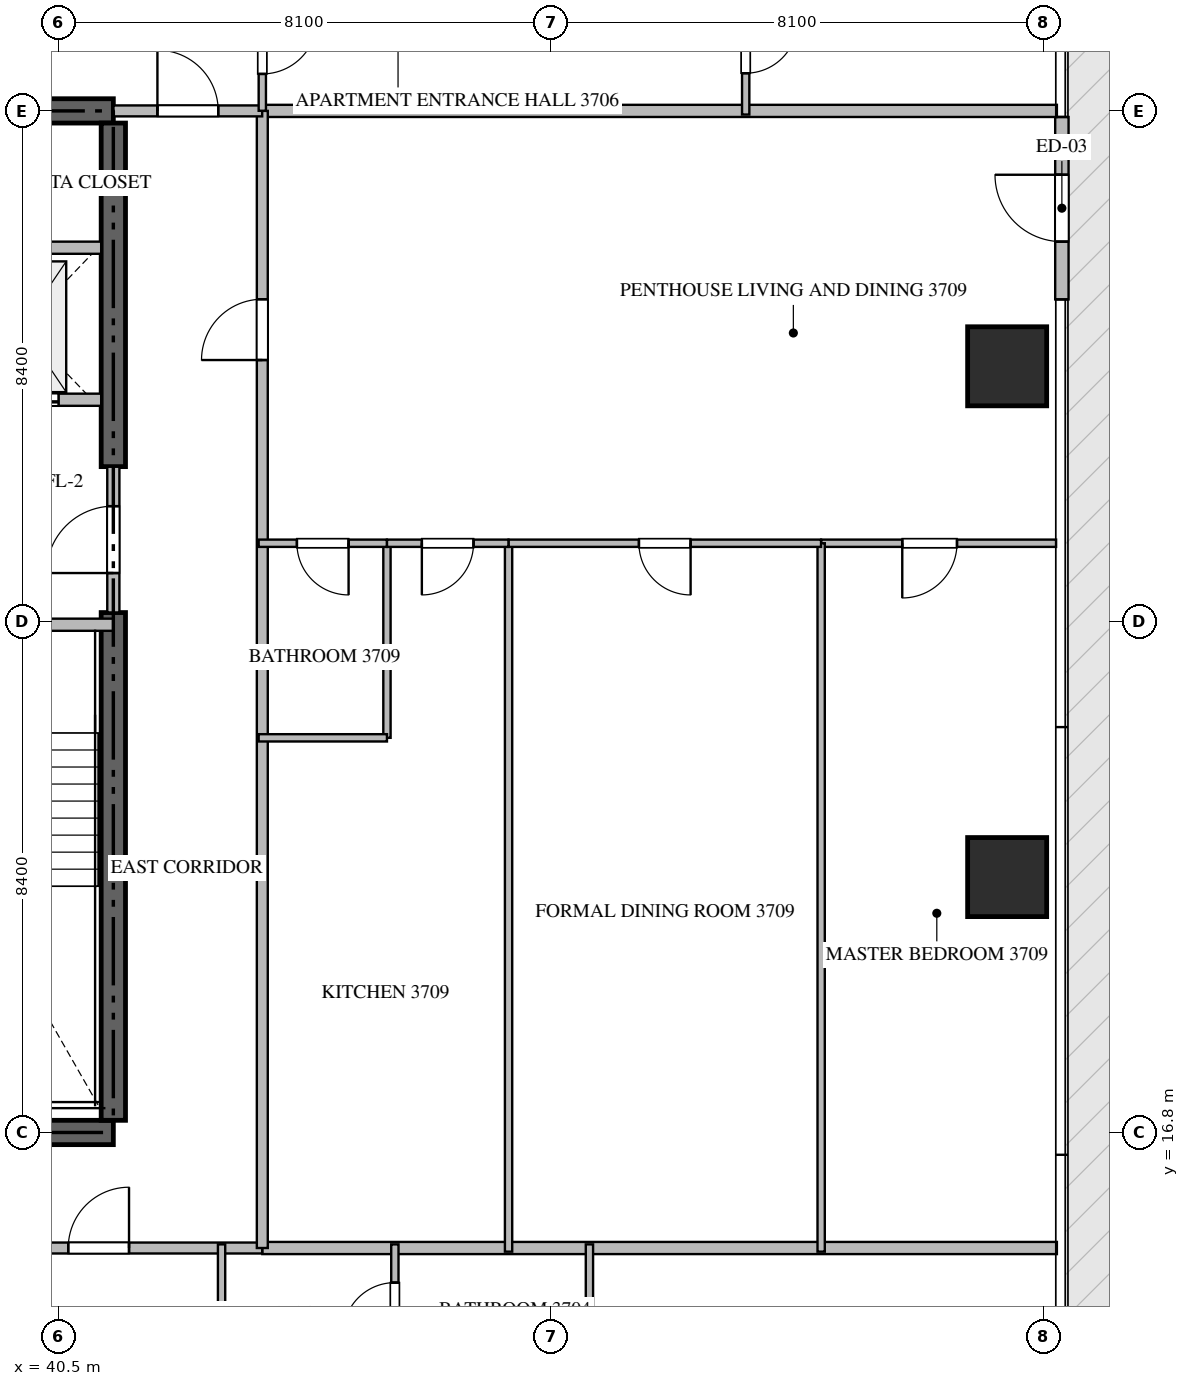
"""IFC4 building model, lengths in metres.
Left out: names, types, materials, properties, quantities, classifications, styles, units other than length and angle.
Written with IfcOpenShell. Run it as: python <this file> out.ifc"""

import sys

from ifc_helpers import new_model, si_unit, direction, frame, frame_2d, origin, origin_2d, place, context, subcontext, project, spatial, rectangle, extrude, source, transform, mapped, element, fill, save


model = new_model("IFC4")
c1 = context("Model", 3, precision=1e-05, world=origin(), true_north=direction((0.0, 1.0)))
c2 = subcontext(c1, "Body", "Model", "MODEL_VIEW")
j1 = project(units=[si_unit("LENGTHUNIT", "METRE"), si_unit("PLANEANGLEUNIT", "RADIAN")], contexts=[c1])
p1 = place(None, origin())
s1 = spatial("IfcSite", under=j1, at=p1, CompositionType="ELEMENT")
p2 = place(p1, origin())
s2 = spatial("IfcBuilding", under=s1, at=p2, CompositionType="ELEMENT")
p3 = place(p2, frame((0.0, 0.0, 150.15)))
s3 = spatial("IfcBuildingStorey", under=s2, at=p3, CompositionType="ELEMENT", Elevation=150.15)
for number, where, z_axis, x_axis in (
    (1, (23.4, 16.8, -0.26), (0.0, 0.0, 1.0), (1.0, 0.0, 0.0)),
    (2, (41.4, 33.6, -0.26), (0.0, 0.0, 1.0), (-1.0, 0.0, 0.0)),
):
    element("IfcWall", number, at=place(p3, frame(where, z_axis=z_axis, x_axis=x_axis)), inside=s3, PredefinedType="SHEAR", context=c2, shape_type="SweptSolid", body=[
        extrude(rectangle(XDim=18.0, YDim=0.4, at=frame_2d((9.0, 0.0))), origin(), (0.0, 0.0, 1.0), 3.748),
    ])
p4 = place(p3, frame((41.4, 17.0, -0.26), z_axis=(0.0, 0.0, 1.0), x_axis=(0.0, 1.0, 0.0)))
e3 = element("IfcWall", 3, at=p4, inside=s3, PredefinedType="SHEAR", context=c2, shape_type="SweptSolid", body=[
    extrude(rectangle(XDim=8.35, YDim=0.4, at=frame_2d((4.175, 0.0))), origin(), (0.0, 0.0, 1.0), 3.748),
])
p5 = place(p3, frame((41.4, 27.75, -0.26), z_axis=(0.0, 0.0, 1.0), x_axis=(0.0, 1.0, 0.0)))
e4 = element("IfcWall", 4, at=p5, inside=s3, PredefinedType="SHEAR", context=c2, shape_type="SweptSolid", body=[
    extrude(rectangle(XDim=5.65, YDim=0.4, at=frame_2d((2.825, 0.0))), origin(), (0.0, 0.0, 1.0), 3.748),
])
m1 = source(origin(), c2, "Body", "SweptSolid", [
    extrude(rectangle(XDim=1.3, YDim=1.3, at=origin_2d()), origin(), (0.0, 0.0, 1.0), 3.75),
])
for number, where, z_axis, x_axis in (
    (5, (56.1, 21.0, -0.26), (0.0, 0.0, 1.0), (1.0, 0.0, 0.0)),
    (6, (56.1, 29.4, -0.26), (0.0, 0.0, 1.0), (1.0, 0.0, 0.0)),
):
    element("IfcColumn", number, at=place(p3, frame(where, z_axis=z_axis, x_axis=x_axis)), inside=s3, PredefinedType="COLUMN", context=c2, shape_type="MappedRepresentation", body=[
        mapped(m1, transform((0.0, 0.0, 0.0), scale=1.0)),
    ])
p6 = place(p3, frame((57.0, 30.5, 0.0), z_axis=(0.0, 0.0, 1.0), x_axis=(0.0, 1.0, 0.0)))
e7 = element("IfcWall", 7, at=p6, inside=s3, PredefinedType="ELEMENTEDWALL", context=c2, shape_type="SweptSolid", body=[
    extrude(rectangle(XDim=3.0, YDim=0.22, at=frame_2d((1.5, 0.0))), origin(), (0.0, 0.0, 1.0), 3.475),
])
p7 = place(p6, frame((0.95, 0.0, 0.0)))
e8 = element("IfcOpeningElement", 8, at=p7, cuts=e7, PredefinedType="OPENING", context=c2, shape_type="SweptSolid", body=[
    extrude(rectangle(XDim=1.1, YDim=2.2, at=frame_2d((0.55, 1.1))), frame((0.0, 0.12, 0.0), z_axis=(0.0, -1.0, 0.0), x_axis=(1.0, 0.0, 0.0)), (0.0, 0.0, 1.0), 0.24),
])
p8 = place(p3, frame((36.95, 25.15, 0.0), z_axis=(0.0, 0.0, 1.0), x_axis=(1.0, 0.0, 0.0)))
e9 = element("IfcWall", 9, at=p8, inside=s3, PredefinedType="STANDARD", context=c2, shape_type="SweptSolid", body=[
    extrude(rectangle(XDim=4.45, YDim=0.2, at=frame_2d((2.225, 0.0))), origin(), (0.0, 0.0, 1.0), 3.49),
])
p9 = place(p8, frame((1.65, 0.0, 0.0)))
e10 = element("IfcOpeningElement", 10, at=p9, cuts=e9, PredefinedType="OPENING", context=c2, shape_type="SweptSolid", body=[
    extrude(rectangle(XDim=1.1, YDim=2.15, at=frame_2d((0.55, 1.075))), frame((0.0, 0.11, 0.0), z_axis=(0.0, -1.0, 0.0), x_axis=(1.0, 0.0, 0.0)), (0.0, 0.0, 1.0), 0.22),
])
p10 = place(p3, frame((38.75, 28.85, 0.0), z_axis=(0.0, 0.0, 1.0), x_axis=(1.0, 0.0, 0.0)))
e11 = element("IfcWall", 11, at=p10, inside=s3, PredefinedType="STANDARD", context=c2, shape_type="SweptSolid", body=[
    extrude(rectangle(XDim=2.45, YDim=0.2, at=frame_2d((1.225, 0.0))), origin(), (0.0, 0.0, 1.0), 3.49),
])
p11 = place(p10, frame((0.55, 0.0, 0.0)))
e12 = element("IfcOpeningElement", 12, at=p11, cuts=e11, PredefinedType="OPENING", context=c2, shape_type="SweptSolid", body=[
    extrude(rectangle(XDim=1.2, YDim=2.2, at=frame_2d((0.6, 1.1))), frame((0.0, 0.11, 0.0), z_axis=(0.0, -1.0, 0.0), x_axis=(1.0, 0.0, 0.0)), (0.0, 0.0, 1.0), 0.22),
])
p12 = place(p3, frame((38.75, 31.35, 0.0), z_axis=(0.0, 0.0, 1.0), x_axis=(1.0, 0.0, 0.0)))
e13 = element("IfcWall", 13, at=p12, inside=s3, PredefinedType="STANDARD", context=c2, shape_type="SweptSolid", body=[
    extrude(rectangle(XDim=2.45, YDim=0.2, at=frame_2d((1.225, 0.0))), origin(), (0.0, 0.0, 1.0), 3.49),
])
p13 = place(p3, frame((41.4, 25.352, 0.0), z_axis=(0.0, 0.0, 1.0), x_axis=(0.0, 1.0, 0.0)))
e14 = element("IfcWall", 14, at=p13, inside=s3, PredefinedType="STANDARD", context=c2, shape_type="SweptSolid", body=[
    extrude(rectangle(XDim=2.396, YDim=0.2, at=frame_2d((1.198, 0.0))), origin(), (0.0, 0.0, 1.0), 3.49),
])
p14 = place(p13, frame((0.648, 0.0, 0.0)))
e15 = element("IfcOpeningElement", 15, at=p14, cuts=e14, PredefinedType="OPENING", context=c2, shape_type="SweptSolid", body=[
    extrude(rectangle(XDim=1.1, YDim=2.15, at=frame_2d((0.55, 1.075))), frame((0.0, 0.11, 0.0), z_axis=(0.0, -1.0, 0.0), x_axis=(1.0, 0.0, 0.0)), (0.0, 0.0, 1.0), 0.22),
])
for number, where, z_axis, x_axis in (
    (16, (43.85, 14.9, 0.0), (0.0, 0.0, 1.0), (1.0, 0.0, 0.0)),
    (17, (43.85, 33.6, 0.0), (0.0, 0.0, 1.0), (1.0, 0.0, 0.0)),
):
    element("IfcWall", number, at=place(p3, frame(where, z_axis=z_axis, x_axis=x_axis)), inside=s3, PredefinedType="PARTITIONING", context=c2, shape_type="SweptSolid", body=[
        extrude(rectangle(XDim=13.068, YDim=0.2, at=frame_2d((6.534, 0.0))), origin(), (0.0, 0.0, 1.0), 3.49),
    ])
p15 = place(p3, frame((20.952, 14.9, 0.0), z_axis=(0.0, 0.0, 1.0), x_axis=(1.0, 0.0, 0.0)))
e18 = element("IfcWall", 18, at=p15, inside=s3, PredefinedType="PARTITIONING", context=c2, shape_type="SweptSolid", body=[
    extrude(rectangle(XDim=22.896, YDim=0.18, at=frame_2d((11.448, 0.0))), origin(), (0.0, 0.0, 1.0), 3.49),
])
p16 = place(p15, frame((2.19, 0.0, 0.0)))
e19 = element("IfcOpeningElement", 19, at=p16, cuts=e18, PredefinedType="OPENING", context=c2, shape_type="SweptSolid", body=[
    extrude(rectangle(XDim=1.0, YDim=2.15, at=frame_2d((0.5, 1.075))), frame((0.0, 0.1, 0.0), z_axis=(0.0, -1.0, 0.0), x_axis=(1.0, 0.0, 0.0)), (0.0, 0.0, 1.0), 0.2),
])
p17 = place(p15, frame((5.802, 0.0, 0.0)))
e20 = element("IfcOpeningElement", 20, at=p17, cuts=e18, PredefinedType="OPENING", context=c2, shape_type="SweptSolid", body=[
    extrude(rectangle(XDim=1.0, YDim=2.15, at=frame_2d((0.5, 1.075))), frame((0.0, 0.1, 0.0), z_axis=(0.0, -1.0, 0.0), x_axis=(1.0, 0.0, 0.0)), (0.0, 0.0, 1.0), 0.2),
])
p18 = place(p15, frame((12.196, 0.0, 0.0)))
e21 = element("IfcOpeningElement", 21, at=p18, cuts=e18, PredefinedType="OPENING", context=c2, shape_type="SweptSolid", body=[
    extrude(rectangle(XDim=1.0, YDim=2.15, at=frame_2d((0.5, 1.075))), frame((0.0, 0.1, 0.0), z_axis=(0.0, -1.0, 0.0), x_axis=(1.0, 0.0, 0.0)), (0.0, 0.0, 1.0), 0.2),
])
p19 = place(p15, frame((19.706, 0.0, 0.0)))
e22 = element("IfcOpeningElement", 22, at=p19, cuts=e18, PredefinedType="OPENING", context=c2, shape_type="SweptSolid", body=[
    extrude(rectangle(XDim=1.0, YDim=2.15, at=frame_2d((0.5, 1.075))), frame((0.0, 0.1, 0.0), z_axis=(0.0, -1.0, 0.0), x_axis=(1.0, 0.0, 0.0)), (0.0, 0.0, 1.0), 0.2),
])
p20 = place(p3, frame((43.85, 14.9, 0.0), z_axis=(0.0, 0.0, 1.0), x_axis=(0.0, 1.0, 0.0)))
e23 = element("IfcWall", 23, at=p20, inside=s3, PredefinedType="PARTITIONING", context=c2, shape_type="SweptSolid", body=[
    extrude(rectangle(XDim=18.7, YDim=0.18, at=frame_2d((9.35, 0.0))), origin(), (0.0, 0.0, 1.0), 3.49),
])
p21 = place(p20, frame((14.603, 0.0, 0.0)))
e24 = element("IfcOpeningElement", 24, at=p21, cuts=e23, PredefinedType="OPENING", context=c2, shape_type="SweptSolid", body=[
    extrude(rectangle(XDim=1.0, YDim=2.15, at=frame_2d((0.5, 1.075))), frame((0.0, 0.1, 0.0), z_axis=(0.0, -1.0, 0.0), x_axis=(1.0, 0.0, 0.0)), (0.0, 0.0, 1.0), 0.2),
])
p22 = place(p3, frame((41.402, 33.6, 0.0), z_axis=(0.0, 0.0, 1.0), x_axis=(1.0, 0.0, 0.0)))
e25 = element("IfcWall", 25, at=p22, inside=s3, PredefinedType="PARTITIONING", context=c2, shape_type="SweptSolid", body=[
    extrude(rectangle(XDim=2.446, YDim=0.18, at=frame_2d((1.223, 0.0))), origin(), (0.0, 0.0, 1.0), 3.49),
])
p23 = place(p22, frame((0.723, 0.0, 0.0)))
e26 = element("IfcOpeningElement", 26, at=p23, cuts=e25, PredefinedType="OPENING", context=c2, shape_type="SweptSolid", body=[
    extrude(rectangle(XDim=1.0, YDim=2.15, at=frame_2d((0.5, 1.075))), frame((0.0, 0.1, 0.0), z_axis=(0.0, -1.0, 0.0), x_axis=(1.0, 0.0, 0.0)), (0.0, 0.0, 1.0), 0.2),
])
p24 = place(p3, frame((43.18, 12.15, 0.0), z_axis=(0.0, 0.0, 1.0), x_axis=(0.0, 1.0, 0.0)))
e27 = element("IfcWall", 27, at=p24, inside=s3, PredefinedType="PARTITIONING", context=c2, shape_type="SweptSolid", body=[
    extrude(rectangle(XDim=2.81, YDim=0.12, at=frame_2d((1.405, 0.0))), origin(), (0.0, 0.0, 1.0), 3.49),
])
p25 = place(p3, frame((49.23, 12.85, 0.0), z_axis=(0.0, 0.0, 1.0), x_axis=(0.0, 1.0, 0.0)))
e28 = element("IfcWall", 28, at=p25, inside=s3, PredefinedType="PARTITIONING", context=c2, shape_type="SweptSolid", body=[
    extrude(rectangle(XDim=2.11, YDim=0.12, at=frame_2d((1.055, 0.0))), origin(), (0.0, 0.0, 1.0), 3.49),
])
p26 = place(p3, frame((46.03, 12.852, 0.0), z_axis=(0.0, 0.0, 1.0), x_axis=(0.0, 1.0, 0.0)))
e29 = element("IfcWall", 29, at=p26, inside=s3, PredefinedType="PARTITIONING", context=c2, shape_type="SweptSolid", body=[
    extrude(rectangle(XDim=2.108, YDim=0.12, at=frame_2d((1.054, 0.0))), origin(), (0.0, 0.0, 1.0), 3.49),
])
p27 = place(p26, frame((0.629, 0.0, 0.0)))
e30 = element("IfcOpeningElement", 30, at=p27, cuts=e29, PredefinedType="OPENING", context=c2, shape_type="SweptSolid", body=[
    extrude(rectangle(XDim=0.85, YDim=2.1, at=frame_2d((0.425, 1.05))), frame((0.0, 0.07, 0.0), z_axis=(0.0, -1.0, 0.0), x_axis=(1.0, 0.0, 0.0)), (0.0, 0.0, 1.0), 0.14),
])
p28 = place(p3, frame((43.85, 35.75, 0.0), z_axis=(0.0, 0.0, 1.0), x_axis=(0.0, -1.0, 0.0)))
e31 = element("IfcWall", 31, at=p28, inside=s3, PredefinedType="PARTITIONING", context=c2, shape_type="SweptSolid", body=[
    extrude(rectangle(XDim=2.148, YDim=0.12, at=frame_2d((1.074, 0.0))), origin(), (0.0, 0.0, 1.0), 3.49),
])
p29 = place(p28, frame((0.642, 0.0, 0.0)))
e32 = element("IfcOpeningElement", 32, at=p29, cuts=e31, PredefinedType="OPENING", context=c2, shape_type="SweptSolid", body=[
    extrude(rectangle(XDim=0.9, YDim=2.1, at=frame_2d((0.45, 1.05))), frame((0.0, 0.07, 0.0), z_axis=(0.0, -1.0, 0.0), x_axis=(1.0, 0.0, 0.0)), (0.0, 0.0, 1.0), 0.14),
])
p30 = place(p3, frame((51.8, 35.75, 0.0), z_axis=(0.0, 0.0, 1.0), x_axis=(0.0, -1.0, 0.0)))
e33 = element("IfcWall", 33, at=p30, inside=s3, PredefinedType="PARTITIONING", context=c2, shape_type="SweptSolid", body=[
    extrude(rectangle(XDim=2.21, YDim=0.12, at=frame_2d((1.105, 0.0))), origin(), (0.0, 0.0, 1.0), 3.49),
])
p31 = place(p30, frame((0.68, 0.0, 0.0)))
e34 = element("IfcOpeningElement", 34, at=p31, cuts=e33, PredefinedType="OPENING", context=c2, shape_type="SweptSolid", body=[
    extrude(rectangle(XDim=0.85, YDim=2.1, at=frame_2d((0.425, 1.05))), frame((0.0, 0.07, 0.0), z_axis=(0.0, -1.0, 0.0), x_axis=(1.0, 0.0, 0.0)), (0.0, 0.0, 1.0), 0.14),
])
p32 = place(p3, frame((56.905, 26.49, 0.0), z_axis=(0.0, 0.0, 1.0), x_axis=(-1.0, 0.0, 0.0)))
e35 = element("IfcWall", 35, at=p32, inside=s3, PredefinedType="PARTITIONING", context=c2, shape_type="SweptSolid", body=[
    extrude(rectangle(XDim=3.864, YDim=0.12, at=frame_2d((1.932, 0.0))), origin(), (0.0, 0.0, 1.0), 3.49),
])
p33 = place(p32, frame((1.63, 0.0, 0.0)))
e36 = element("IfcOpeningElement", 36, at=p33, cuts=e35, PredefinedType="OPENING", context=c2, shape_type="SweptSolid", body=[
    extrude(rectangle(XDim=0.9, YDim=2.1, at=frame_2d((0.45, 1.05))), frame((0.0, 0.07, 0.0), z_axis=(0.0, -1.0, 0.0), x_axis=(1.0, 0.0, 0.0)), (0.0, 0.0, 1.0), 0.14),
])
p34 = place(p3, frame((53.041, 14.84, 0.0), z_axis=(0.0, 0.0, 1.0), x_axis=(0.0, 1.0, 0.0)))
e37 = element("IfcWall", 37, at=p34, inside=s3, PredefinedType="PARTITIONING", context=c2, shape_type="SweptSolid", body=[
    extrude(rectangle(XDim=11.65, YDim=0.12, at=frame_2d((5.825, 0.0))), origin(), (0.0, 0.0, 1.0), 3.49),
])
p35 = place(p3, frame((47.9, 14.84, 0.0), z_axis=(0.0, 0.0, 1.0), x_axis=(0.0, 1.0, 0.0)))
e38 = element("IfcWall", 38, at=p35, inside=s3, PredefinedType="PARTITIONING", context=c2, shape_type="SweptSolid", body=[
    extrude(rectangle(XDim=11.65, YDim=0.12, at=frame_2d((5.825, 0.0))), origin(), (0.0, 0.0, 1.0), 2.972),
])
p36 = place(p3, frame((45.9, 23.29, 0.0), z_axis=(0.0, 0.0, 1.0), x_axis=(0.0, 1.0, 0.0)))
e39 = element("IfcWall", 39, at=p36, inside=s3, PredefinedType="PARTITIONING", context=c2, shape_type="SweptSolid", body=[
    extrude(rectangle(XDim=3.2, YDim=0.12, at=frame_2d((1.6, 0.0))), origin(), (0.0, 0.0, 1.0), 3.49),
])
p37 = place(p3, frame((45.9, 23.29, 0.0), z_axis=(0.0, 0.0, 1.0), x_axis=(-1.0, 0.0, 0.0)))
e40 = element("IfcWall", 40, at=p37, inside=s3, PredefinedType="PARTITIONING", context=c2, shape_type="SweptSolid", body=[
    extrude(rectangle(XDim=2.11, YDim=0.12, at=frame_2d((1.055, 0.0))), origin(), (0.0, 0.0, 1.0), 3.49),
])
p38 = place(p3, frame((53.039, 26.49, 0.0), z_axis=(0.0, 0.0, 1.0), x_axis=(-1.0, 0.0, 0.0)))
e41 = element("IfcWall", 41, at=p38, inside=s3, PredefinedType="PARTITIONING", context=c2, shape_type="SweptSolid", body=[
    extrude(rectangle(XDim=5.139, YDim=0.12, at=frame_2d((2.57, 0.0))), origin(), (0.0, 0.0, 1.0), 3.49),
])
p39 = place(p38, frame((2.145, 0.0, 0.0)))
e42 = element("IfcOpeningElement", 42, at=p39, cuts=e41, PredefinedType="OPENING", context=c2, shape_type="SweptSolid", body=[
    extrude(rectangle(XDim=0.85, YDim=2.1, at=frame_2d((0.425, 1.05))), frame((0.0, 0.07, 0.0), z_axis=(0.0, -1.0, 0.0), x_axis=(1.0, 0.0, 0.0)), (0.0, 0.0, 1.0), 0.14),
])
p40 = place(p3, frame((47.898, 26.49, 0.0), z_axis=(0.0, 0.0, 1.0), x_axis=(-1.0, 0.0, 0.0)))
e43 = element("IfcWall", 43, at=p40, inside=s3, PredefinedType="PARTITIONING", context=c2, shape_type="SweptSolid", body=[
    extrude(rectangle(XDim=1.998, YDim=0.12, at=frame_2d((0.999, 0.0))), origin(), (0.0, 0.0, 1.0), 3.49),
])
p41 = place(p40, frame((0.574, 0.0, 0.0)))
e44 = element("IfcOpeningElement", 44, at=p41, cuts=e43, PredefinedType="OPENING", context=c2, shape_type="SweptSolid", body=[
    extrude(rectangle(XDim=0.85, YDim=2.1, at=frame_2d((0.425, 1.05))), frame((0.0, 0.07, 0.0), z_axis=(0.0, -1.0, 0.0), x_axis=(1.0, 0.0, 0.0)), (0.0, 0.0, 1.0), 0.14),
])
p42 = place(p3, frame((45.898, 26.49, 0.0), z_axis=(0.0, 0.0, 1.0), x_axis=(-1.0, 0.0, 0.0)))
e45 = element("IfcWall", 45, at=p42, inside=s3, PredefinedType="PARTITIONING", context=c2, shape_type="SweptSolid", body=[
    extrude(rectangle(XDim=2.108, YDim=0.12, at=frame_2d((1.054, 0.0))), origin(), (0.0, 0.0, 1.0), 3.49),
])
p43 = place(p42, frame((0.629, 0.0, 0.0)))
e46 = element("IfcOpeningElement", 46, at=p43, cuts=e45, PredefinedType="OPENING", context=c2, shape_type="SweptSolid", body=[
    extrude(rectangle(XDim=0.85, YDim=2.1, at=frame_2d((0.425, 1.05))), frame((0.0, 0.07, 0.0), z_axis=(0.0, -1.0, 0.0), x_axis=(1.0, 0.0, 0.0)), (0.0, 0.0, 1.0), 0.14),
])
m2 = source(origin(), c2, "Body", "SweptSolid", [
    extrude(rectangle(XDim=1.1, YDim=2.2, at=frame_2d((0.55, 1.1))), frame((0.0, 0.025, 0.0), z_axis=(0.0, -1.0, 0.0), x_axis=(1.0, 0.0, 0.0)), (0.0, 0.0, 1.0), 0.05),
])
p44 = place(p7, origin())
e47 = element("IfcDoor", 47, at=p44, inside=s3, OperationType="SINGLE_SWING_RIGHT", PredefinedType="DOOR", context=c2, shape_type="MappedRepresentation", body=[
    mapped(m2, transform((0.0, 0.0, 0.0), scale=1.0)),
])
fill(e8, e47)
m3 = source(origin(), c2, "Body", "SweptSolid", [
    extrude(rectangle(XDim=1.2, YDim=2.2, at=frame_2d((0.6, 1.1))), frame((0.0, 0.025, 0.0), z_axis=(0.0, -1.0, 0.0), x_axis=(1.0, 0.0, 0.0)), (0.0, 0.0, 1.0), 0.05),
])
p45 = place(p11, origin())
e48 = element("IfcDoor", 48, at=p45, inside=s3, OperationType="DOUBLE_DOOR_SLIDING", PredefinedType="DOOR", context=c2, shape_type="MappedRepresentation", body=[
    mapped(m3, transform((0.0, 0.0, 0.0), scale=1.0)),
])
fill(e12, e48)
m4 = source(origin(), c2, "Body", "SweptSolid", [
    extrude(rectangle(XDim=1.1, YDim=2.15, at=frame_2d((0.55, 1.075))), frame((0.0, 0.025, 0.0), z_axis=(0.0, -1.0, 0.0), x_axis=(1.0, 0.0, 0.0)), (0.0, 0.0, 1.0), 0.05),
])
p46 = place(p14, origin())
e49 = element("IfcDoor", 49, at=p46, inside=s3, OperationType="SINGLE_SWING_LEFT", PredefinedType="DOOR", context=c2, shape_type="MappedRepresentation", body=[
    mapped(m4, transform((0.0, 0.0, 0.0), scale=1.0)),
])
fill(e15, e49)
m5 = source(origin(), c2, "Body", "SweptSolid", [
    extrude(rectangle(XDim=1.0, YDim=2.15, at=frame_2d((0.5, 1.075))), frame((0.0, 0.025, 0.0), z_axis=(0.0, -1.0, 0.0), x_axis=(1.0, 0.0, 0.0)), (0.0, 0.0, 1.0), 0.05),
])
p47 = place(p19, origin())
e50 = element("IfcDoor", 50, at=p47, inside=s3, OperationType="SINGLE_SWING_RIGHT", PredefinedType="DOOR", context=c2, shape_type="MappedRepresentation", body=[
    mapped(m5, transform((0.0, 0.0, 0.0), scale=1.0)),
])
fill(e22, e50)
p48 = place(p21, origin())
e51 = element("IfcDoor", 51, at=p48, inside=s3, OperationType="SINGLE_SWING_LEFT", PredefinedType="DOOR", context=c2, shape_type="MappedRepresentation", body=[
    mapped(m5, transform((0.0, 0.0, 0.0), scale=1.0)),
])
fill(e24, e51)
p49 = place(p23, origin())
e52 = element("IfcDoor", 52, at=p49, inside=s3, OperationType="SINGLE_SWING_LEFT", PredefinedType="DOOR", context=c2, shape_type="MappedRepresentation", body=[
    mapped(m5, transform((0.0, 0.0, 0.0), scale=1.0)),
])
fill(e26, e52)
m6 = source(origin(), c2, "Body", "SweptSolid", [
    extrude(rectangle(XDim=0.85, YDim=2.1, at=frame_2d((0.425, 1.05))), frame((0.0, 0.025, 0.0), z_axis=(0.0, -1.0, 0.0), x_axis=(1.0, 0.0, 0.0)), (0.0, 0.0, 1.0), 0.05),
])
p50 = place(p27, origin())
e53 = element("IfcDoor", 53, at=p50, inside=s3, OperationType="SINGLE_SWING_LEFT", PredefinedType="DOOR", context=c2, shape_type="MappedRepresentation", body=[
    mapped(m6, transform((0.0, 0.0, 0.0), scale=1.0)),
])
fill(e30, e53)
m7 = source(origin(), c2, "Body", "SweptSolid", [
    extrude(rectangle(XDim=0.9, YDim=2.1, at=frame_2d((0.45, 1.05))), frame((0.0, 0.025, 0.0), z_axis=(0.0, -1.0, 0.0), x_axis=(1.0, 0.0, 0.0)), (0.0, 0.0, 1.0), 0.05),
])
p51 = place(p29, origin())
e54 = element("IfcDoor", 54, at=p51, inside=s3, OperationType="SINGLE_SWING_LEFT", PredefinedType="DOOR", context=c2, shape_type="MappedRepresentation", body=[
    mapped(m7, transform((0.0, 0.0, 0.0), scale=1.0)),
])
fill(e32, e54)
p52 = place(p31, origin())
e55 = element("IfcDoor", 55, at=p52, inside=s3, OperationType="SINGLE_SWING_LEFT", PredefinedType="DOOR", context=c2, shape_type="MappedRepresentation", body=[
    mapped(m6, transform((0.0, 0.0, 0.0), scale=1.0)),
])
fill(e34, e55)
p53 = place(p33, origin())
e56 = element("IfcDoor", 56, at=p53, inside=s3, OperationType="SINGLE_SWING_RIGHT", PredefinedType="DOOR", context=c2, shape_type="MappedRepresentation", body=[
    mapped(m7, transform((0.0, 0.0, 0.0), scale=1.0)),
])
fill(e36, e56)
p54 = place(p39, origin())
e57 = element("IfcDoor", 57, at=p54, inside=s3, OperationType="SINGLE_SWING_LEFT", PredefinedType="DOOR", context=c2, shape_type="MappedRepresentation", body=[
    mapped(m6, transform((0.0, 0.0, 0.0), scale=1.0)),
])
fill(e42, e57)
p55 = place(p41, origin())
e58 = element("IfcDoor", 58, at=p55, inside=s3, OperationType="SINGLE_SWING_RIGHT", PredefinedType="DOOR", context=c2, shape_type="MappedRepresentation", body=[
    mapped(m6, transform((0.0, 0.0, 0.0), scale=1.0)),
])
fill(e44, e58)
p56 = place(p43, origin())
e59 = element("IfcDoor", 59, at=p56, inside=s3, OperationType="SINGLE_SWING_LEFT", PredefinedType="DOOR", context=c2, shape_type="MappedRepresentation", body=[
    mapped(m6, transform((0.0, 0.0, 0.0), scale=1.0)),
])
fill(e46, e59)
save(model, sys.argv[1])
